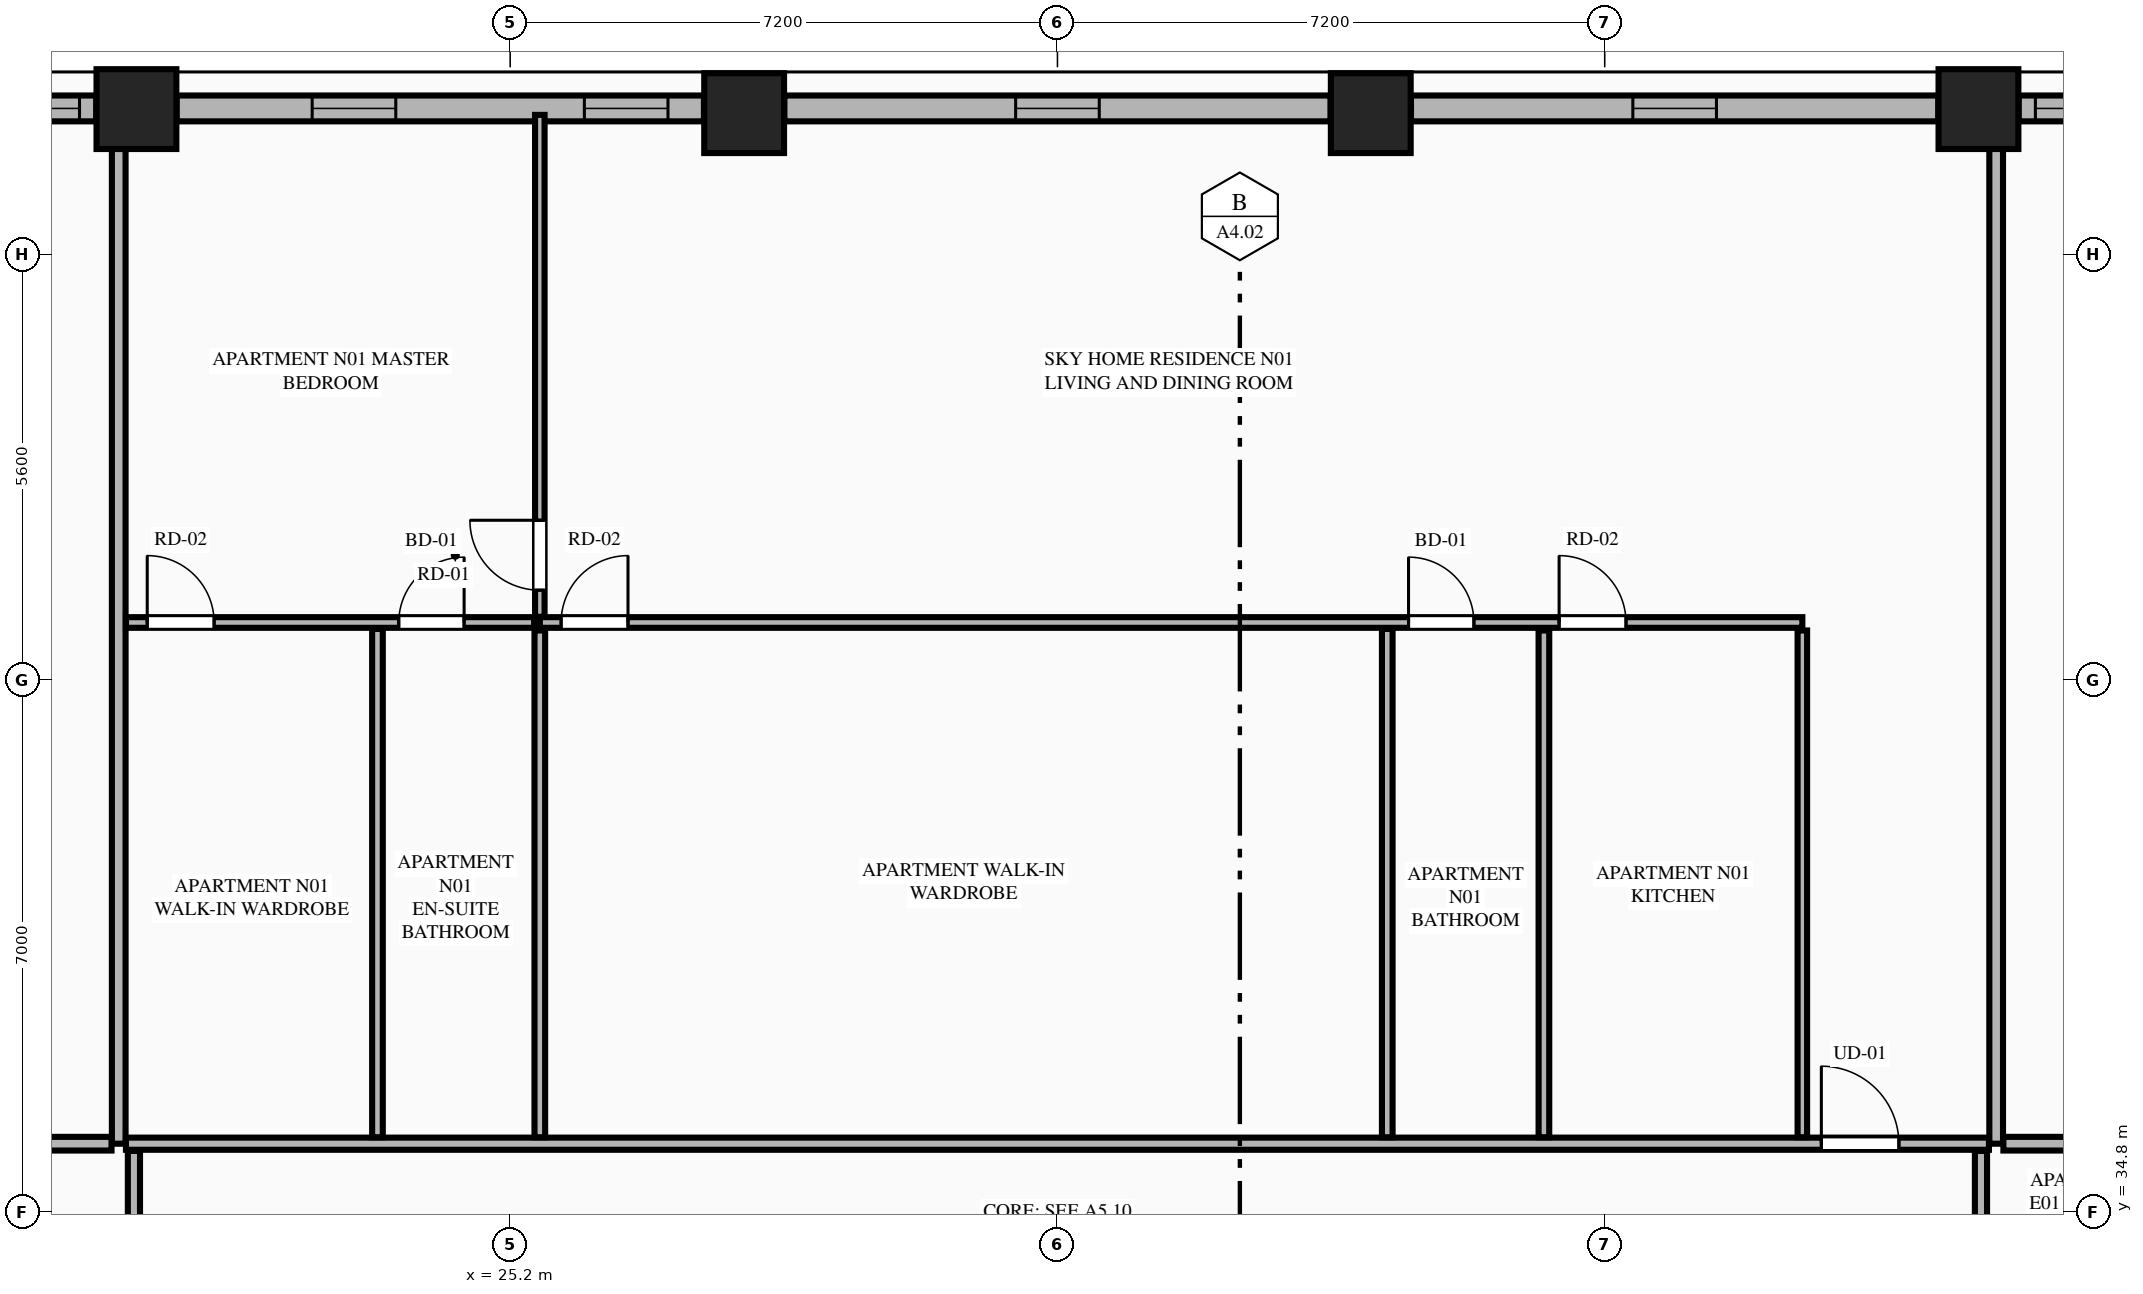
"""IFC4 building model, lengths in metres.
Left out: names, types, materials, properties, quantities, classifications, styles, units other than length and angle.
Written with IfcOpenShell. Run it as: python <this file> out.ifc"""

import sys

from ifc_helpers import new_model, si_unit, direction, frame, frame_2d, origin, origin_2d, place, context, subcontext, project, spatial, rectangle, extrude, element, fill, save


model = new_model("IFC4")
c1 = context("Model", 3, precision=1e-05, world=origin(), true_north=direction((0.0, 1.0)))
c2 = subcontext(c1, "Body", "Model", "MODEL_VIEW")
j1 = project(units=[si_unit("LENGTHUNIT", "METRE"), si_unit("PLANEANGLEUNIT", "RADIAN")], contexts=[c1])
p1 = place(None, origin())
s1 = spatial("IfcSite", under=j1, at=p1, CompositionType="ELEMENT")
p2 = place(p1, origin())
s2 = spatial("IfcBuilding", under=s1, at=p2, CompositionType="ELEMENT")
p3 = place(p2, frame((0.0, 0.0, 80.0)))
s3 = spatial("IfcBuildingStorey", under=s2, at=p3, CompositionType="ELEMENT", Elevation=80.0)
for number, where, z_axis, x_axis in (
    (1, (44.517, 49.311, 0.0), (0.0, 0.0, 1.0), (1.0, 0.0, 0.0)),
    (2, (36.522, 49.258, 0.0), (0.0, 0.0, 1.0), (1.0, 0.0, 0.0)),
    (3, (28.278, 49.258, 0.0), (0.0, 0.0, 1.0), (1.0, 0.0, 0.0)),
    (4, (20.283, 49.311, 0.0), (0.0, 0.0, 1.0), (1.0, 0.0, 0.0)),
):
    element("IfcColumn", number, at=place(p3, frame(where, z_axis=z_axis, x_axis=x_axis)), inside=s3, PredefinedType="COLUMN", context=c2, shape_type="SweptSolid", body=[
        extrude(rectangle(XDim=1.05, YDim=1.05, at=origin_2d()), origin(), (0.0, 0.0, 1.0), 3.55),
    ])
p4 = place(p3, frame((46.366, 49.32, 0.0), z_axis=(0.0, 0.0, 1.0), x_axis=(-1.0, 0.0, 0.0)))
e5 = element("IfcWall", 5, at=p4, inside=s3, PredefinedType="STANDARD", context=c2, shape_type="SweptSolid", body=[
    extrude(rectangle(XDim=1.32, YDim=0.34, at=frame_2d((0.66, 0.0))), origin(), (0.0, 0.0, 1.0), 3.33),
])
p5 = place(p4, frame((0.22, 0.0, 0.75)))
e6 = element("IfcOpeningElement", 6, at=p5, cuts=e5, PredefinedType="OPENING", context=c2, shape_type="SweptSolid", body=[
    extrude(rectangle(XDim=0.88, YDim=2.0, at=frame_2d((0.44, 1.0))), frame((0.0, 0.18, 0.0), z_axis=(0.0, -1.0, 0.0), x_axis=(1.0, 0.0, 0.0)), (0.0, 0.0, 1.0), 0.36),
])
p6 = place(p3, frame((43.988, 49.32, 0.0), z_axis=(0.0, 0.0, 1.0), x_axis=(-1.0, 0.0, 0.0)))
e7 = element("IfcWall", 7, at=p6, inside=s3, PredefinedType="STANDARD", context=c2, shape_type="SweptSolid", body=[
    extrude(rectangle(XDim=6.937, YDim=0.34, at=frame_2d((3.469, 0.0))), origin(), (0.0, 0.0, 1.0), 2.787),
])
p7 = place(p6, frame((2.918, 0.0, 0.75)))
e8 = element("IfcOpeningElement", 8, at=p7, cuts=e7, PredefinedType="OPENING", context=c2, shape_type="SweptSolid", body=[
    extrude(rectangle(XDim=1.1, YDim=1.887, at=frame_2d((0.55, 0.943))), frame((0.0, 0.18, 0.0), z_axis=(0.0, -1.0, 0.0), x_axis=(1.0, 0.0, 0.0)), (0.0, 0.0, 1.0), 0.36),
])
p8 = place(p3, frame((35.993, 49.32, 0.0), z_axis=(0.0, 0.0, 1.0), x_axis=(-1.0, 0.0, 0.0)))
e9 = element("IfcWall", 9, at=p8, inside=s3, PredefinedType="STANDARD", context=c2, shape_type="SweptSolid", body=[
    extrude(rectangle(XDim=7.186, YDim=0.34, at=frame_2d((3.593, 0.0))), origin(), (0.0, 0.0, 1.0), 2.787),
])
p9 = place(p8, frame((3.043, 0.0, 0.75)))
e10 = element("IfcOpeningElement", 10, at=p9, cuts=e9, PredefinedType="OPENING", context=c2, shape_type="SweptSolid", body=[
    extrude(rectangle(XDim=1.1, YDim=1.887, at=frame_2d((0.55, 0.943))), frame((0.0, 0.18, 0.0), z_axis=(0.0, -1.0, 0.0), x_axis=(1.0, 0.0, 0.0)), (0.0, 0.0, 1.0), 0.36),
])
p10 = place(p3, frame((27.749, 49.32, 0.0), z_axis=(0.0, 0.0, 1.0), x_axis=(-1.0, 0.0, 0.0)))
e11 = element("IfcWall", 11, at=p10, inside=s3, PredefinedType="STANDARD", context=c2, shape_type="SweptSolid", body=[
    extrude(rectangle(XDim=6.937, YDim=0.34, at=frame_2d((3.469, 0.0))), origin(), (0.0, 0.0, 1.0), 2.787),
])
p11 = place(p10, frame((0.473, 0.0, 0.75)))
e12 = element("IfcOpeningElement", 12, at=p11, cuts=e11, PredefinedType="OPENING", context=c2, shape_type="SweptSolid", body=[
    extrude(rectangle(XDim=1.1, YDim=1.887, at=frame_2d((0.55, 0.943))), frame((0.0, 0.18, 0.0), z_axis=(0.0, -1.0, 0.0), x_axis=(1.0, 0.0, 0.0)), (0.0, 0.0, 1.0), 0.36),
])
p12 = place(p10, frame((4.054, 0.0, 0.75)))
e13 = element("IfcOpeningElement", 13, at=p12, cuts=e11, PredefinedType="OPENING", context=c2, shape_type="SweptSolid", body=[
    extrude(rectangle(XDim=1.1, YDim=1.887, at=frame_2d((0.55, 0.943))), frame((0.0, 0.18, 0.0), z_axis=(0.0, -1.0, 0.0), x_axis=(1.0, 0.0, 0.0)), (0.0, 0.0, 1.0), 0.36),
])
p13 = place(p3, frame((19.754, 49.32, 0.0), z_axis=(0.0, 0.0, 1.0), x_axis=(-1.0, 0.0, 0.0)))
e14 = element("IfcWall", 14, at=p13, inside=s3, PredefinedType="STANDARD", context=c2, shape_type="SweptSolid", body=[
    extrude(rectangle(XDim=1.32, YDim=0.34, at=frame_2d((0.66, 0.0))), origin(), (0.0, 0.0, 1.0), 3.33),
])
p14 = place(p13, frame((0.22, 0.0, 0.75)))
e15 = element("IfcOpeningElement", 15, at=p14, cuts=e14, PredefinedType="OPENING", context=c2, shape_type="SweptSolid", body=[
    extrude(rectangle(XDim=0.88, YDim=2.0, at=frame_2d((0.44, 1.0))), frame((0.0, 0.18, 0.0), z_axis=(0.0, -1.0, 0.0), x_axis=(1.0, 0.0, 0.0)), (0.0, 0.0, 1.0), 0.36),
])
for number, where, z_axis, x_axis in (
    (16, (20.05, 35.7, 0.0), (0.0, 0.0, 1.0), (0.0, 1.0, 0.0)),
    (17, (44.75, 35.7, 0.0), (0.0, 0.0, 1.0), (0.0, 1.0, 0.0)),
):
    element("IfcWall", number, at=place(p3, frame(where, z_axis=z_axis, x_axis=x_axis)), inside=s3, PredefinedType="PARTITIONING", context=c2, shape_type="SweptSolid", body=[
        extrude(rectangle(XDim=13.445, YDim=0.18, at=frame_2d((6.723, 0.0))), origin(), (0.0, 0.0, 1.0), 3.33),
    ])
p15 = place(p3, frame((20.145, 35.7, 0.0), z_axis=(0.0, 0.0, 1.0), x_axis=(1.0, 0.0, 0.0)))
e18 = element("IfcWall", 18, at=p15, inside=s3, PredefinedType="PARTITIONING", context=c2, shape_type="SweptSolid", body=[
    extrude(rectangle(XDim=24.51, YDim=0.16, at=frame_2d((12.255, 0.0))), origin(), (0.0, 0.0, 1.0), 3.33),
])
p16 = place(p15, frame((22.305, 0.0, 0.0)))
e19 = element("IfcOpeningElement", 19, at=p16, cuts=e18, PredefinedType="OPENING", context=c2, shape_type="SweptSolid", body=[
    extrude(rectangle(XDim=1.02, YDim=2.25, at=frame_2d((0.51, 1.125))), frame((0.0, 0.09, 0.0), z_axis=(0.0, -1.0, 0.0), x_axis=(1.0, 0.0, 0.0)), (0.0, 0.0, 1.0), 0.18),
])
p17 = place(p3, frame((42.2, 35.785, 0.0), z_axis=(0.0, 0.0, 1.0), x_axis=(0.0, 1.0, 0.0)))
e20 = element("IfcWall", 20, at=p17, inside=s3, PredefinedType="PARTITIONING", context=c2, shape_type="SweptSolid", body=[
    extrude(rectangle(XDim=6.667, YDim=0.125, at=frame_2d((3.333, 0.0))), origin(), (0.0, 0.0, 1.0), 2.7),
])
p18 = place(p3, frame((25.59, 42.557, 0.0), z_axis=(0.0, 0.0, 1.0), x_axis=(1.0, 0.0, 0.0)))
e21 = element("IfcWall", 21, at=p18, inside=s3, PredefinedType="PLUMBINGWALL", context=c2, shape_type="SweptSolid", body=[
    extrude(rectangle(XDim=16.61, YDim=0.14, at=frame_2d((8.305, 0.0))), origin(), (0.0, 0.0, 1.0), 3.33),
])
p19 = place(p18, frame((0.28, 0.0, 0.0)))
e22 = element("IfcOpeningElement", 22, at=p19, cuts=e21, PredefinedType="OPENING", context=c2, shape_type="SweptSolid", body=[
    extrude(rectangle(XDim=0.88, YDim=2.15, at=frame_2d((0.44, 1.075))), frame((0.0, 0.08, 0.0), z_axis=(0.0, -1.0, 0.0), x_axis=(1.0, 0.0, 0.0)), (0.0, 0.0, 1.0), 0.16),
])
p20 = place(p18, frame((11.429, 0.0, 0.0)))
e23 = element("IfcOpeningElement", 23, at=p20, cuts=e21, PredefinedType="OPENING", context=c2, shape_type="SweptSolid", body=[
    extrude(rectangle(XDim=0.86, YDim=2.1, at=frame_2d((0.43, 1.05))), frame((0.0, 0.08, 0.0), z_axis=(0.0, -1.0, 0.0), x_axis=(1.0, 0.0, 0.0)), (0.0, 0.0, 1.0), 0.16),
])
p21 = place(p18, frame((13.41, 0.0, 0.0)))
e24 = element("IfcOpeningElement", 24, at=p21, cuts=e21, PredefinedType="OPENING", context=c2, shape_type="SweptSolid", body=[
    extrude(rectangle(XDim=0.88, YDim=2.15, at=frame_2d((0.44, 1.075))), frame((0.0, 0.08, 0.0), z_axis=(0.0, -1.0, 0.0), x_axis=(1.0, 0.0, 0.0)), (0.0, 0.0, 1.0), 0.16),
])
p22 = place(p3, frame((20.145, 42.557, 0.0), z_axis=(0.0, 0.0, 1.0), x_axis=(1.0, 0.0, 0.0)))
e25 = element("IfcWall", 25, at=p22, inside=s3, PredefinedType="PLUMBINGWALL", context=c2, shape_type="SweptSolid", body=[
    extrude(rectangle(XDim=5.37, YDim=0.14, at=frame_2d((2.685, 0.0))), origin(), (0.0, 0.0, 1.0), 3.33),
])
p23 = place(p22, frame((0.28, 0.0, 0.0)))
e26 = element("IfcOpeningElement", 26, at=p23, cuts=e25, PredefinedType="OPENING", context=c2, shape_type="SweptSolid", body=[
    extrude(rectangle(XDim=0.88, YDim=2.15, at=frame_2d((0.44, 1.075))), frame((0.0, 0.08, 0.0), z_axis=(0.0, -1.0, 0.0), x_axis=(1.0, 0.0, 0.0)), (0.0, 0.0, 1.0), 0.16),
])
p24 = place(p22, frame((3.589, 0.0, 0.0)))
e27 = element("IfcOpeningElement", 27, at=p24, cuts=e25, PredefinedType="OPENING", context=c2, shape_type="SweptSolid", body=[
    extrude(rectangle(XDim=0.86, YDim=2.1, at=frame_2d((0.43, 1.05))), frame((0.0, 0.08, 0.0), z_axis=(0.0, -1.0, 0.0), x_axis=(1.0, 0.0, 0.0)), (0.0, 0.0, 1.0), 0.16),
])
for number, where, z_axis, x_axis in (
    (28, (38.8, 35.785, 0.0), (0.0, 0.0, 1.0), (0.0, 1.0, 0.0)),
    (29, (25.59, 35.785, 0.0), (0.0, 0.0, 1.0), (0.0, 1.0, 0.0)),
):
    element("IfcWall", number, at=place(p3, frame(where, z_axis=z_axis, x_axis=x_axis)), inside=s3, PredefinedType="PLUMBINGWALL", context=c2, shape_type="SweptSolid", body=[
        extrude(rectangle(XDim=6.667, YDim=0.14, at=frame_2d((3.333, 0.0))), origin(), (0.0, 0.0, 1.0), 3.33),
    ])
p25 = place(p3, frame((25.59, 42.632, 0.0), z_axis=(0.0, 0.0, 1.0), x_axis=(0.0, 1.0, 0.0)))
e30 = element("IfcWall", 30, at=p25, inside=s3, PredefinedType="PARTITIONING", context=c2, shape_type="SweptSolid", body=[
    extrude(rectangle(XDim=6.603, YDim=0.125, at=frame_2d((3.302, 0.0))), origin(), (0.0, 0.0, 1.0), 3.33),
])
p26 = place(p25, frame((0.35, 0.0, 0.0)))
e31 = element("IfcOpeningElement", 31, at=p26, cuts=e30, PredefinedType="OPENING", context=c2, shape_type="SweptSolid", body=[
    extrude(rectangle(XDim=0.92, YDim=2.15, at=frame_2d((0.46, 1.075))), frame((0.0, 0.073, 0.0), z_axis=(0.0, -1.0, 0.0), x_axis=(1.0, 0.0, 0.0)), (0.0, 0.0, 1.0), 0.145),
])
for number, where, z_axis, x_axis in (
    (32, (36.739, 35.785, 0.0), (0.0, 0.0, 1.0), (0.0, 1.0, 0.0)),
    (33, (23.454, 35.785, 0.0), (0.0, 0.0, 1.0), (0.0, 1.0, 0.0)),
):
    element("IfcWall", number, at=place(p3, frame(where, z_axis=z_axis, x_axis=x_axis)), inside=s3, PredefinedType="PLUMBINGWALL", context=c2, shape_type="SweptSolid", body=[
        extrude(rectangle(XDim=6.687, YDim=0.14, at=frame_2d((3.344, 0.0))), origin(), (0.0, 0.0, 1.0), 3.33),
    ])
for number, where, z_axis, x_axis in (
    (34, (10.589, 35.7, 0.0), (0.0, 0.0, 1.0), (1.0, 0.0, 0.0)),
    (35, (44.845, 35.7, 0.0), (0.0, 0.0, 1.0), (1.0, 0.0, 0.0)),
):
    element("IfcWall", number, at=place(p3, frame(where, z_axis=z_axis, x_axis=x_axis)), inside=s3, PredefinedType="PARTITIONING", context=c2, shape_type="SweptSolid", body=[
        extrude(rectangle(XDim=9.366, YDim=0.18, at=frame_2d((4.683, 0.0))), origin(), (0.0, 0.0, 1.0), 3.33),
    ])
p27 = place(p3, frame((20.25, 16.195, 0.0), z_axis=(0.0, 0.0, 1.0), x_axis=(0.0, 1.0, 0.0)))
e36 = element("IfcWall", 36, at=p27, inside=s3, PredefinedType="PARTITIONING", context=c2, shape_type="SweptSolid", body=[
    extrude(rectangle(XDim=19.41, YDim=0.16, at=frame_2d((9.705, 0.0))), origin(), (0.0, 0.0, 1.0), 2.7),
])
p28 = place(p27, frame((0.45, 0.0, 0.0)))
e37 = element("IfcOpeningElement", 37, at=p28, cuts=e36, PredefinedType="OPENING", context=c2, shape_type="SweptSolid", body=[
    extrude(rectangle(XDim=1.02, YDim=2.25, at=frame_2d((0.51, 1.125))), frame((0.0, 0.09, 0.0), z_axis=(0.0, -1.0, 0.0), x_axis=(1.0, 0.0, 0.0)), (0.0, 0.0, 1.0), 0.18),
])
p29 = place(p3, frame((44.55, 16.195, 0.0), z_axis=(0.0, 0.0, 1.0), x_axis=(0.0, 1.0, 0.0)))
e38 = element("IfcWall", 38, at=p29, inside=s3, PredefinedType="PARTITIONING", context=c2, shape_type="SweptSolid", body=[
    extrude(rectangle(XDim=19.41, YDim=0.16, at=frame_2d((9.705, 0.0))), origin(), (0.0, 0.0, 1.0), 2.7),
])
p30 = place(p29, frame((0.45, 0.0, 0.0)))
e39 = element("IfcOpeningElement", 39, at=p30, cuts=e38, PredefinedType="OPENING", context=c2, shape_type="SweptSolid", body=[
    extrude(rectangle(XDim=1.02, YDim=2.25, at=frame_2d((0.51, 1.125))), frame((0.0, 0.09, 0.0), z_axis=(0.0, -1.0, 0.0), x_axis=(1.0, 0.0, 0.0)), (0.0, 0.0, 1.0), 0.18),
])
p31 = place(p7, origin())
e40 = element("IfcWindow", 40, at=p31, inside=s3, PartitioningType="SINGLE_PANEL", PredefinedType="WINDOW", context=c2, shape_type="SweptSolid", body=[
    extrude(rectangle(XDim=1.1, YDim=1.887, at=frame_2d((0.55, 0.943))), frame((0.0, 0.03, 0.0), z_axis=(0.0, -1.0, 0.0), x_axis=(1.0, 0.0, 0.0)), (0.0, 0.0, 1.0), 0.06),
])
fill(e8, e40)
p32 = place(p9, origin())
e41 = element("IfcWindow", 41, at=p32, inside=s3, PartitioningType="SINGLE_PANEL", PredefinedType="WINDOW", context=c2, shape_type="SweptSolid", body=[
    extrude(rectangle(XDim=1.1, YDim=1.887, at=frame_2d((0.55, 0.943))), frame((0.0, 0.03, 0.0), z_axis=(0.0, -1.0, 0.0), x_axis=(1.0, 0.0, 0.0)), (0.0, 0.0, 1.0), 0.06),
])
fill(e10, e41)
p33 = place(p11, origin())
e42 = element("IfcWindow", 42, at=p33, inside=s3, PartitioningType="SINGLE_PANEL", PredefinedType="WINDOW", context=c2, shape_type="SweptSolid", body=[
    extrude(rectangle(XDim=1.1, YDim=1.887, at=frame_2d((0.55, 0.943))), frame((0.0, 0.03, 0.0), z_axis=(0.0, -1.0, 0.0), x_axis=(1.0, 0.0, 0.0)), (0.0, 0.0, 1.0), 0.06),
])
fill(e12, e42)
p34 = place(p19, origin())
e43 = element("IfcDoor", 43, at=p34, inside=s3, OperationType="SINGLE_SWING_RIGHT", PredefinedType="DOOR", context=c2, shape_type="SweptSolid", body=[
    extrude(rectangle(XDim=0.88, YDim=2.15, at=frame_2d((0.44, 1.075))), frame((0.0, 0.025, 0.0), z_axis=(0.0, -1.0, 0.0), x_axis=(1.0, 0.0, 0.0)), (0.0, 0.0, 1.0), 0.05),
])
fill(e22, e43)
p35 = place(p20, origin())
e44 = element("IfcDoor", 44, at=p35, inside=s3, OperationType="SINGLE_SWING_LEFT", PredefinedType="DOOR", context=c2, shape_type="SweptSolid", body=[
    extrude(rectangle(XDim=0.86, YDim=2.1, at=frame_2d((0.43, 1.05))), frame((0.0, 0.025, 0.0), z_axis=(0.0, -1.0, 0.0), x_axis=(1.0, 0.0, 0.0)), (0.0, 0.0, 1.0), 0.05),
])
fill(e23, e44)
p36 = place(p23, origin())
e45 = element("IfcDoor", 45, at=p36, inside=s3, OperationType="SINGLE_SWING_LEFT", PredefinedType="DOOR", context=c2, shape_type="SweptSolid", body=[
    extrude(rectangle(XDim=0.88, YDim=2.15, at=frame_2d((0.44, 1.075))), frame((0.0, 0.025, 0.0), z_axis=(0.0, -1.0, 0.0), x_axis=(1.0, 0.0, 0.0)), (0.0, 0.0, 1.0), 0.05),
])
fill(e26, e45)
p37 = place(p24, origin())
e46 = element("IfcDoor", 46, at=p37, inside=s3, OperationType="SINGLE_SWING_RIGHT", PredefinedType="DOOR", context=c2, shape_type="SweptSolid", body=[
    extrude(rectangle(XDim=0.86, YDim=2.1, at=frame_2d((0.43, 1.05))), frame((0.0, 0.025, 0.0), z_axis=(0.0, -1.0, 0.0), x_axis=(1.0, 0.0, 0.0)), (0.0, 0.0, 1.0), 0.05),
])
fill(e27, e46)
p38 = place(p16, origin())
e47 = element("IfcDoor", 47, at=p38, inside=s3, OperationType="SINGLE_SWING_LEFT", PredefinedType="DOOR", context=c2, shape_type="SweptSolid", body=[
    extrude(rectangle(XDim=1.02, YDim=2.25, at=frame_2d((0.51, 1.125))), frame((0.0, 0.025, 0.0), z_axis=(0.0, -1.0, 0.0), x_axis=(1.0, 0.0, 0.0)), (0.0, 0.0, 1.0), 0.05),
])
fill(e19, e47)
p39 = place(p21, origin())
e48 = element("IfcDoor", 48, at=p39, inside=s3, OperationType="SINGLE_SWING_LEFT", PredefinedType="DOOR", context=c2, shape_type="SweptSolid", body=[
    extrude(rectangle(XDim=0.88, YDim=2.15, at=frame_2d((0.44, 1.075))), frame((0.0, 0.025, 0.0), z_axis=(0.0, -1.0, 0.0), x_axis=(1.0, 0.0, 0.0)), (0.0, 0.0, 1.0), 0.05),
])
fill(e24, e48)
p40 = place(p26, origin())
e49 = element("IfcDoor", 49, at=p40, inside=s3, OperationType="SINGLE_SWING_RIGHT", PredefinedType="DOOR", context=c2, shape_type="SweptSolid", body=[
    extrude(rectangle(XDim=0.92, YDim=2.15, at=frame_2d((0.46, 1.075))), frame((0.0, 0.025, 0.0), z_axis=(0.0, -1.0, 0.0), x_axis=(1.0, 0.0, 0.0)), (0.0, 0.0, 1.0), 0.05),
])
fill(e31, e49)
p41 = place(p5, origin())
e50 = element("IfcWindow", 50, at=p41, inside=s3, PartitioningType="SINGLE_PANEL", PredefinedType="WINDOW", context=c2, shape_type="SweptSolid", body=[
    extrude(rectangle(XDim=0.88, YDim=2.0, at=frame_2d((0.44, 1.0))), frame((0.0, 0.03, 0.0), z_axis=(0.0, -1.0, 0.0), x_axis=(1.0, 0.0, 0.0)), (0.0, 0.0, 1.0), 0.06),
])
fill(e6, e50)
p42 = place(p12, origin())
e51 = element("IfcWindow", 51, at=p42, inside=s3, PartitioningType="SINGLE_PANEL", PredefinedType="WINDOW", context=c2, shape_type="SweptSolid", body=[
    extrude(rectangle(XDim=1.1, YDim=1.887, at=frame_2d((0.55, 0.943))), frame((0.0, 0.03, 0.0), z_axis=(0.0, -1.0, 0.0), x_axis=(1.0, 0.0, 0.0)), (0.0, 0.0, 1.0), 0.06),
])
fill(e13, e51)
p43 = place(p14, origin())
e52 = element("IfcWindow", 52, at=p43, inside=s3, PartitioningType="SINGLE_PANEL", PredefinedType="WINDOW", context=c2, shape_type="SweptSolid", body=[
    extrude(rectangle(XDim=0.88, YDim=2.0, at=frame_2d((0.44, 1.0))), frame((0.0, 0.03, 0.0), z_axis=(0.0, -1.0, 0.0), x_axis=(1.0, 0.0, 0.0)), (0.0, 0.0, 1.0), 0.06),
])
fill(e15, e52)
save(model, sys.argv[1])
